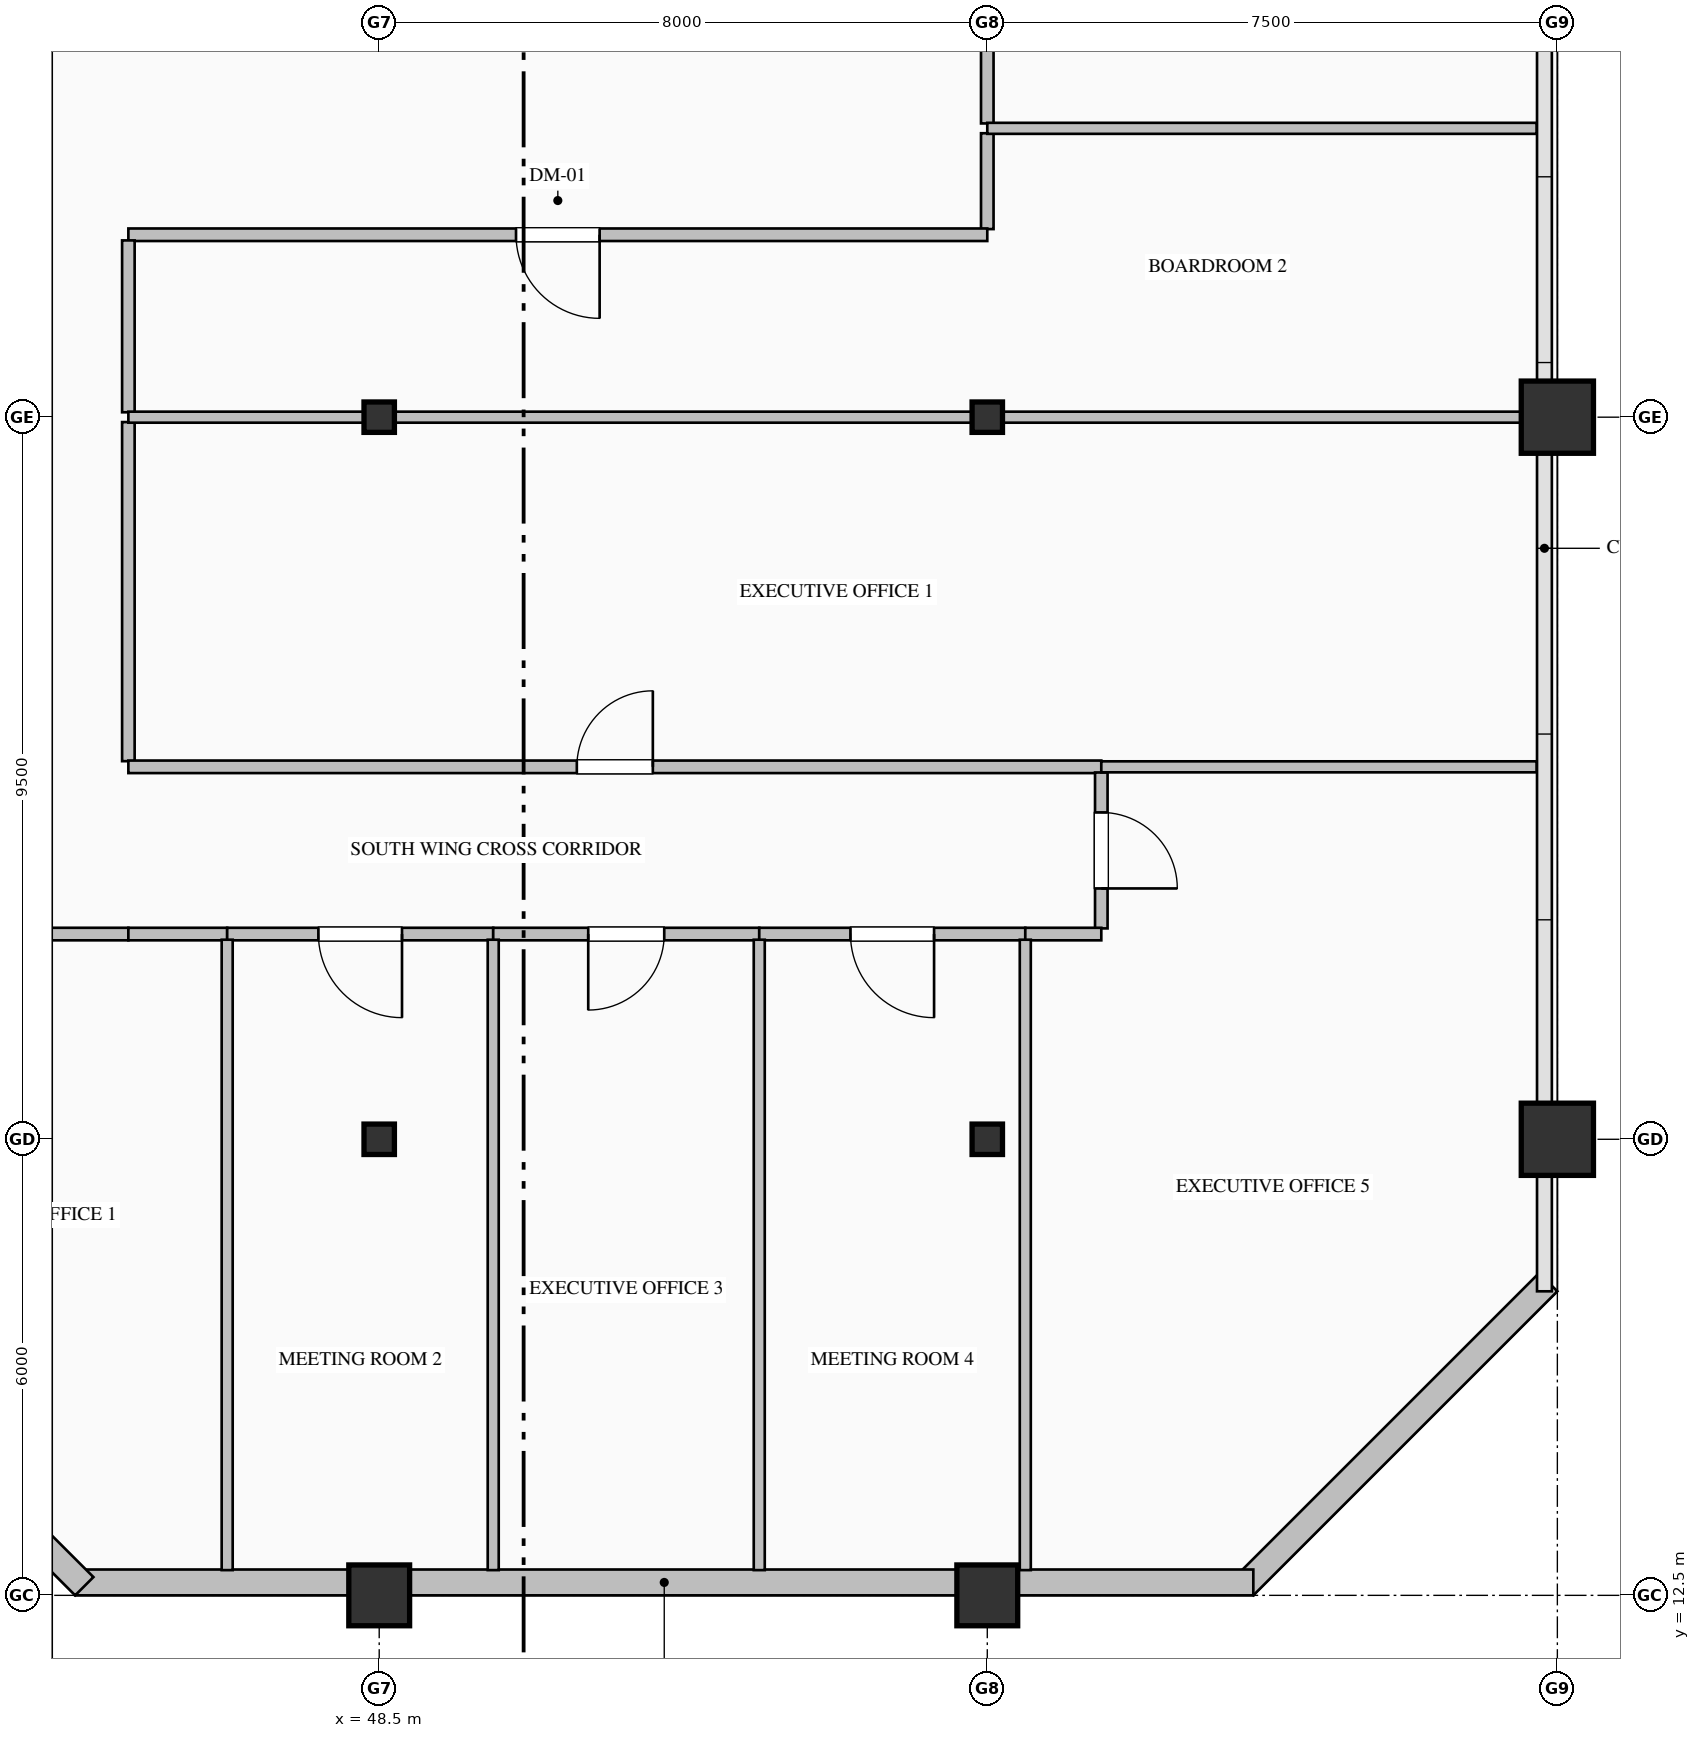
"""IFC4 building model, lengths in metres.
Left out: names, types, materials, properties, quantities, classifications, styles, units other than length and angle.
Written with IfcOpenShell. Run it as: python <this file> out.ifc"""

import sys

from ifc_helpers import new_model, si_unit, direction, frame, frame_2d, origin, origin_2d, place, context, subcontext, project, spatial, rectangle, hollow_rectangle, i_section, extrude, element, fill, save


model = new_model("IFC4")
c1 = context("Model", 3, precision=1e-05, world=origin(), true_north=direction((0.0, 1.0)))
c2 = subcontext(c1, "Body", "Model", "MODEL_VIEW")
j1 = project(units=[si_unit("LENGTHUNIT", "METRE"), si_unit("PLANEANGLEUNIT", "RADIAN")], contexts=[c1])
p1 = place(None, origin())
s1 = spatial("IfcSite", under=j1, at=p1, CompositionType="ELEMENT")
p2 = place(p1, origin())
s2 = spatial("IfcBuilding", under=s1, at=p2, CompositionType="ELEMENT")
p3 = place(p2, frame((0.0, 0.0, 209.8)))
s3 = spatial("IfcBuildingStorey", under=s2, at=p3, CompositionType="ELEMENT", Elevation=209.8)
p4 = place(p3, frame((48.5, 12.5, 0.0), z_axis=(0.0, 0.0, 1.0), x_axis=(1.0, 0.0, 0.0)))
e1 = element("IfcColumn", 1, at=p4, inside=s3, PredefinedType="COLUMN", context=c2, shape_type="SweptSolid", body=[
    extrude(hollow_rectangle(XDim=0.8, YDim=0.8, WallThickness=0.032, at=origin_2d()), origin(), (0.0, 0.0, 1.0), 4.0),
])
for number, where, z_axis, x_axis in (
    (2, (48.5, 18.5, 0.0), (0.0, 0.0, 1.0), (1.0, 0.0, 0.0)),
    (3, (48.5, 28.0, 0.0), (0.0, 0.0, 1.0), (1.0, 0.0, 0.0)),
):
    element("IfcColumn", number, at=place(p3, frame(where, z_axis=z_axis, x_axis=x_axis)), inside=s3, PredefinedType="COLUMN", context=c2, shape_type="SweptSolid", body=[
        extrude(i_section(OverallWidth=0.4, OverallDepth=0.4, WebThickness=0.013, FlangeThickness=0.021, FilletRadius=0.022, at=origin_2d()), origin(), (0.0, 0.0, 1.0), 4.0),
    ])
p5 = place(p3, frame((56.5, 12.5, 0.0), z_axis=(0.0, 0.0, 1.0), x_axis=(1.0, 0.0, 0.0)))
e4 = element("IfcColumn", 4, at=p5, inside=s3, PredefinedType="COLUMN", context=c2, shape_type="SweptSolid", body=[
    extrude(hollow_rectangle(XDim=0.8, YDim=0.8, WallThickness=0.032, at=origin_2d()), origin(), (0.0, 0.0, 1.0), 4.0),
])
for number, where, z_axis, x_axis in (
    (5, (56.5, 18.5, 0.0), (0.0, 0.0, 1.0), (1.0, 0.0, 0.0)),
    (6, (56.5, 28.0, 0.0), (0.0, 0.0, 1.0), (1.0, 0.0, 0.0)),
):
    element("IfcColumn", number, at=place(p3, frame(where, z_axis=z_axis, x_axis=x_axis)), inside=s3, PredefinedType="COLUMN", context=c2, shape_type="SweptSolid", body=[
        extrude(i_section(OverallWidth=0.4, OverallDepth=0.4, WebThickness=0.013, FlangeThickness=0.021, FilletRadius=0.022, at=origin_2d()), origin(), (0.0, 0.0, 1.0), 4.0),
    ])
for number, where, z_axis, x_axis in (
    (7, (64.0, 18.5, 0.0), (0.0, 0.0, 1.0), (1.0, 0.0, 0.0)),
    (8, (64.0, 28.0, 0.0), (0.0, 0.0, 1.0), (1.0, 0.0, 0.0)),
):
    element("IfcColumn", number, at=place(p3, frame(where, z_axis=z_axis, x_axis=x_axis)), inside=s3, PredefinedType="COLUMN", context=c2, shape_type="SweptSolid", body=[
        extrude(hollow_rectangle(XDim=0.95, YDim=0.95, WallThickness=0.036, at=origin_2d()), origin(), (0.0, 0.0, 1.0), 4.0),
    ])
p6 = place(p3, frame((63.88, 16.62, 0.0), z_axis=(0.0, 0.0, 1.0), x_axis=(-0.707106781187, -0.707106781187, 0.0)))
e9 = element("IfcWall", 9, at=p6, inside=s3, PredefinedType="SOLIDWALL", context=c2, shape_type="SweptSolid", body=[
    extrude(rectangle(XDim=5.657, YDim=0.34, at=frame_2d((2.828, 0.0))), origin(), (0.0, 0.0, 1.0), 3.775),
])
p7 = place(p3, frame((60.0, 12.67, 0.0), z_axis=(0.0, 0.0, 1.0), x_axis=(-1.0, 0.0, 0.0)))
e10 = element("IfcWall", 10, at=p7, inside=s3, PredefinedType="SOLIDWALL", context=c2, shape_type="SweptSolid", body=[
    extrude(rectangle(XDim=15.5, YDim=0.34, at=frame_2d((7.75, 0.0))), origin(), (0.0, 0.0, 1.0), 3.325),
])
p8 = place(p3, frame((44.62, 12.62, 0.0), z_axis=(0.0, 0.0, 1.0), x_axis=(-0.707106781187, 0.707106781187, 0.0)))
e11 = element("IfcWall", 11, at=p8, inside=s3, PredefinedType="SOLIDWALL", context=c2, shape_type="SweptSolid", body=[
    extrude(rectangle(XDim=5.657, YDim=0.34, at=frame_2d((2.828, 0.0))), origin(), (0.0, 0.0, 1.0), 3.775),
])
p9 = place(p3, frame((56.5, 31.736, 0.0), z_axis=(0.0, 0.0, 1.0), x_axis=(0.0, -1.0, 0.0)))
e12 = element("IfcWall", 12, at=p9, inside=s3, PredefinedType="PARTITIONING", context=c2, shape_type="SweptSolid", body=[
    extrude(rectangle(XDim=1.261, YDim=0.165, at=frame_2d((0.63, 0.0))), origin(), (0.0, 0.0, 1.0), 3.179),
])
p10 = place(p3, frame((56.5, 30.4, 0.0), z_axis=(0.0, 0.0, 1.0), x_axis=(-1.0, 0.0, 0.0)))
e13 = element("IfcWall", 13, at=p10, inside=s3, PredefinedType="PARTITIONING", context=c2, shape_type="SweptSolid", body=[
    extrude(rectangle(XDim=11.3, YDim=0.165, at=frame_2d((5.65, 0.0))), origin(), (0.0, 0.0, 1.0), 3.775),
])
p11 = place(p10, frame((5.1, 0.0, 0.0)))
e14 = element("IfcOpeningElement", 14, at=p11, cuts=e13, PredefinedType="OPENING", context=c2, shape_type="SweptSolid", body=[
    extrude(rectangle(XDim=1.1, YDim=2.2, at=frame_2d((0.55, 1.1))), frame((0.0, 0.093, 0.0), z_axis=(0.0, -1.0, 0.0), x_axis=(1.0, 0.0, 0.0)), (0.0, 0.0, 1.0), 0.185),
])
p12 = place(p3, frame((56.5, 36.0, 0.0), z_axis=(0.0, 0.0, 1.0), x_axis=(0.0, -1.0, 0.0)))
e15 = element("IfcWall", 15, at=p12, inside=s3, PredefinedType="PARTITIONING", context=c2, shape_type="SweptSolid", body=[
    extrude(rectangle(XDim=4.135, YDim=0.165, at=frame_2d((2.068, 0.0))), origin(), (0.0, 0.0, 1.0), 3.179),
])
p13 = place(p12, frame((1.568, 0.0, 0.0)))
e16 = element("IfcOpeningElement", 16, at=p13, cuts=e15, PredefinedType="OPENING", context=c2, shape_type="SweptSolid", body=[
    extrude(rectangle(XDim=1.0, YDim=2.15, at=frame_2d((0.5, 1.075))), frame((0.0, 0.093, 0.0), z_axis=(0.0, -1.0, 0.0), x_axis=(1.0, 0.0, 0.0)), (0.0, 0.0, 1.0), 0.185),
])
p14 = place(p3, frame((45.2, 27.936, 0.0), z_axis=(0.0, 0.0, 1.0), x_axis=(0.0, -1.0, 0.0)))
e17 = element("IfcWall", 17, at=p14, inside=s3, PredefinedType="PARTITIONING", context=c2, shape_type="SweptSolid", body=[
    extrude(rectangle(XDim=4.461, YDim=0.165, at=frame_2d((2.23, 0.0))), origin(), (0.0, 0.0, 1.0), 3.775),
])
p15 = place(p3, frame((45.2, 30.325, 0.0), z_axis=(0.0, 0.0, 1.0), x_axis=(0.0, -1.0, 0.0)))
e18 = element("IfcWall", 18, at=p15, inside=s3, PredefinedType="PARTITIONING", context=c2, shape_type="SweptSolid", body=[
    extrude(rectangle(XDim=2.261, YDim=0.165, at=frame_2d((1.13, 0.0))), origin(), (0.0, 0.0, 1.0), 3.775),
])
p16 = place(p3, frame((45.2, 21.2, 0.0), z_axis=(0.0, 0.0, 1.0), x_axis=(-1.0, 0.0, 0.0)))
e19 = element("IfcWall", 19, at=p16, inside=s3, PredefinedType="PARTITIONING", context=c2, shape_type="SweptSolid", body=[
    extrude(rectangle(XDim=2.2, YDim=0.165, at=frame_2d((1.1, 0.0))), origin(), (0.0, 0.0, 1.0), 3.775),
])
p17 = place(p3, frame((45.2, 23.4, 0.0), z_axis=(0.0, 0.0, 1.0), x_axis=(1.0, 0.0, 0.0)))
e20 = element("IfcWall", 20, at=p17, inside=s3, PredefinedType="PARTITIONING", context=c2, shape_type="SweptSolid", body=[
    extrude(rectangle(XDim=12.8, YDim=0.165, at=frame_2d((6.4, 0.0))), origin(), (0.0, 0.0, 1.0), 3.467),
])
p18 = place(p17, frame((5.9, 0.0, 0.0)))
e21 = element("IfcOpeningElement", 21, at=p18, cuts=e20, PredefinedType="OPENING", context=c2, shape_type="SweptSolid", body=[
    extrude(rectangle(XDim=1.0, YDim=2.15, at=frame_2d((0.5, 1.075))), frame((0.0, 0.093, 0.0), z_axis=(0.0, -1.0, 0.0), x_axis=(1.0, 0.0, 0.0)), (0.0, 0.0, 1.0), 0.185),
])
p19 = place(p3, frame((46.5, 21.2, 0.0), z_axis=(0.0, 0.0, 1.0), x_axis=(-1.0, 0.0, 0.0)))
e22 = element("IfcWall", 22, at=p19, inside=s3, PredefinedType="PARTITIONING", context=c2, shape_type="SweptSolid", body=[
    extrude(rectangle(XDim=1.3, YDim=0.165, at=frame_2d((0.65, 0.0))), origin(), (0.0, 0.0, 1.0), 3.775),
])
p20 = place(p3, frame((50.0, 21.2, 0.0), z_axis=(0.0, 0.0, 1.0), x_axis=(-1.0, 0.0, 0.0)))
e23 = element("IfcWall", 23, at=p20, inside=s3, PredefinedType="PARTITIONING", context=c2, shape_type="SweptSolid", body=[
    extrude(rectangle(XDim=3.5, YDim=0.165, at=frame_2d((1.75, 0.0))), origin(), (0.0, 0.0, 1.0), 3.775),
])
p21 = place(p20, frame((1.2, 0.0, 0.0)))
e24 = element("IfcOpeningElement", 24, at=p21, cuts=e23, PredefinedType="OPENING", context=c2, shape_type="SweptSolid", body=[
    extrude(rectangle(XDim=1.1, YDim=2.2, at=frame_2d((0.55, 1.1))), frame((0.0, 0.093, 0.0), z_axis=(0.0, -1.0, 0.0), x_axis=(1.0, 0.0, 0.0)), (0.0, 0.0, 1.0), 0.185),
])
p22 = place(p3, frame((53.5, 21.2, 0.0), z_axis=(0.0, 0.0, 1.0), x_axis=(-1.0, 0.0, 0.0)))
e25 = element("IfcWall", 25, at=p22, inside=s3, PredefinedType="PARTITIONING", context=c2, shape_type="SweptSolid", body=[
    extrude(rectangle(XDim=3.5, YDim=0.165, at=frame_2d((1.75, 0.0))), origin(), (0.0, 0.0, 1.0), 3.775),
])
p23 = place(p22, frame((1.25, 0.0, 0.0)))
e26 = element("IfcOpeningElement", 26, at=p23, cuts=e25, PredefinedType="OPENING", context=c2, shape_type="SweptSolid", body=[
    extrude(rectangle(XDim=1.0, YDim=2.15, at=frame_2d((0.5, 1.075))), frame((0.0, 0.093, 0.0), z_axis=(0.0, -1.0, 0.0), x_axis=(1.0, 0.0, 0.0)), (0.0, 0.0, 1.0), 0.185),
])
p24 = place(p3, frame((57.0, 21.2, 0.0), z_axis=(0.0, 0.0, 1.0), x_axis=(-1.0, 0.0, 0.0)))
e27 = element("IfcWall", 27, at=p24, inside=s3, PredefinedType="PARTITIONING", context=c2, shape_type="SweptSolid", body=[
    extrude(rectangle(XDim=3.5, YDim=0.165, at=frame_2d((1.75, 0.0))), origin(), (0.0, 0.0, 1.0), 3.775),
])
p25 = place(p24, frame((1.2, 0.0, 0.0)))
e28 = element("IfcOpeningElement", 28, at=p25, cuts=e27, PredefinedType="OPENING", context=c2, shape_type="SweptSolid", body=[
    extrude(rectangle(XDim=1.1, YDim=2.2, at=frame_2d((0.55, 1.1))), frame((0.0, 0.093, 0.0), z_axis=(0.0, -1.0, 0.0), x_axis=(1.0, 0.0, 0.0)), (0.0, 0.0, 1.0), 0.185),
])
p26 = place(p3, frame((58.0, 23.325, 0.0), z_axis=(0.0, 0.0, 1.0), x_axis=(0.0, -1.0, 0.0)))
e29 = element("IfcWall", 29, at=p26, inside=s3, PredefinedType="PARTITIONING", context=c2, shape_type="SweptSolid", body=[
    extrude(rectangle(XDim=2.051, YDim=0.165, at=frame_2d((1.025, 0.0))), origin(), (0.0, 0.0, 1.0), 3.775),
])
p27 = place(p26, frame((0.525, 0.0, 0.0)))
e30 = element("IfcOpeningElement", 30, at=p27, cuts=e29, PredefinedType="OPENING", context=c2, shape_type="SweptSolid", body=[
    extrude(rectangle(XDim=1.0, YDim=2.15, at=frame_2d((0.5, 1.075))), frame((0.0, 0.093, 0.0), z_axis=(0.0, -1.0, 0.0), x_axis=(1.0, 0.0, 0.0)), (0.0, 0.0, 1.0), 0.185),
])
p28 = place(p3, frame((58.0, 21.2, 0.0), z_axis=(0.0, 0.0, 1.0), x_axis=(-1.0, 0.0, 0.0)))
e31 = element("IfcWall", 31, at=p28, inside=s3, PredefinedType="PARTITIONING", context=c2, shape_type="SweptSolid", body=[
    extrude(rectangle(XDim=1.0, YDim=0.165, at=frame_2d((0.5, 0.0))), origin(), (0.0, 0.0, 1.0), 3.775),
])
p29 = place(p3, frame((45.2, 28.0, 0.0), z_axis=(0.0, 0.0, 1.0), x_axis=(1.0, 0.0, 0.0)))
e32 = element("IfcWall", 32, at=p29, inside=s3, PredefinedType="PARTITIONING", context=c2, shape_type="SweptSolid", body=[
    extrude(rectangle(XDim=18.528, YDim=0.145, at=frame_2d((9.264, 0.0))), origin(), (0.0, 0.0, 1.0), 3.179),
])
p30 = place(p3, frame((63.728, 23.4, 0.0), z_axis=(0.0, 0.0, 1.0), x_axis=(-1.0, 0.0, 0.0)))
e33 = element("IfcWall", 33, at=p30, inside=s3, PredefinedType="PARTITIONING", context=c2, shape_type="SweptSolid", body=[
    extrude(rectangle(XDim=5.728, YDim=0.145, at=frame_2d((2.864, 0.0))), origin(), (0.0, 0.0, 1.0), 3.775),
])
p31 = place(p3, frame((56.5, 31.8, 0.0), z_axis=(0.0, 0.0, 1.0), x_axis=(1.0, 0.0, 0.0)))
e34 = element("IfcWall", 34, at=p31, inside=s3, PredefinedType="PARTITIONING", context=c2, shape_type="SweptSolid", body=[
    extrude(rectangle(XDim=7.228, YDim=0.145, at=frame_2d((3.614, 0.0))), origin(), (0.0, 0.0, 1.0), 3.775),
])
for number, where, z_axis, x_axis in (
    (35, (46.5, 21.125, 0.0), (0.0, 0.0, 1.0), (0.0, -1.0, 0.0)),
    (36, (50.0, 21.125, 0.0), (0.0, 0.0, 1.0), (0.0, -1.0, 0.0)),
    (37, (53.5, 21.125, 0.0), (0.0, 0.0, 1.0), (0.0, -1.0, 0.0)),
    (38, (57.0, 21.125, 0.0), (0.0, 0.0, 1.0), (0.0, -1.0, 0.0)),
):
    element("IfcWall", number, at=place(p3, frame(where, z_axis=z_axis, x_axis=x_axis)), inside=s3, PredefinedType="PARTITIONING", context=c2, shape_type="SweptSolid", body=[
        extrude(rectangle(XDim=8.293, YDim=0.145, at=frame_2d((4.147, 0.0))), origin(), (0.0, 0.0, 1.0), 3.775),
    ])
p32 = place(p18, origin())
e39 = element("IfcDoor", 39, at=p32, inside=s3, OperationType="SINGLE_SWING_RIGHT", PredefinedType="DOOR", context=c2, shape_type="SweptSolid", body=[
    extrude(rectangle(XDim=1.0, YDim=2.15, at=frame_2d((0.5, 1.075))), frame((0.0, 0.025, 0.0), z_axis=(0.0, -1.0, 0.0), x_axis=(1.0, 0.0, 0.0)), (0.0, 0.0, 1.0), 0.05),
])
fill(e21, e39)
p33 = place(p11, origin())
e40 = element("IfcDoor", 40, at=p33, inside=s3, OperationType="SINGLE_SWING_LEFT", PredefinedType="DOOR", context=c2, shape_type="SweptSolid", body=[
    extrude(rectangle(XDim=1.1, YDim=2.2, at=frame_2d((0.55, 1.1))), frame((0.0, 0.025, 0.0), z_axis=(0.0, -1.0, 0.0), x_axis=(1.0, 0.0, 0.0)), (0.0, 0.0, 1.0), 0.05),
])
fill(e14, e40)
p34 = place(p21, origin())
e41 = element("IfcDoor", 41, at=p34, inside=s3, OperationType="SINGLE_SWING_LEFT", PredefinedType="DOOR", context=c2, shape_type="SweptSolid", body=[
    extrude(rectangle(XDim=1.1, YDim=2.2, at=frame_2d((0.55, 1.1))), frame((0.0, 0.025, 0.0), z_axis=(0.0, -1.0, 0.0), x_axis=(1.0, 0.0, 0.0)), (0.0, 0.0, 1.0), 0.05),
])
fill(e24, e41)
p35 = place(p23, origin())
e42 = element("IfcDoor", 42, at=p35, inside=s3, OperationType="SINGLE_SWING_RIGHT", PredefinedType="DOOR", context=c2, shape_type="SweptSolid", body=[
    extrude(rectangle(XDim=1.0, YDim=2.15, at=frame_2d((0.5, 1.075))), frame((0.0, 0.025, 0.0), z_axis=(0.0, -1.0, 0.0), x_axis=(1.0, 0.0, 0.0)), (0.0, 0.0, 1.0), 0.05),
])
fill(e26, e42)
p36 = place(p25, origin())
e43 = element("IfcDoor", 43, at=p36, inside=s3, OperationType="SINGLE_SWING_LEFT", PredefinedType="DOOR", context=c2, shape_type="SweptSolid", body=[
    extrude(rectangle(XDim=1.1, YDim=2.2, at=frame_2d((0.55, 1.1))), frame((0.0, 0.025, 0.0), z_axis=(0.0, -1.0, 0.0), x_axis=(1.0, 0.0, 0.0)), (0.0, 0.0, 1.0), 0.05),
])
fill(e28, e43)
p37 = place(p27, origin())
e44 = element("IfcDoor", 44, at=p37, inside=s3, OperationType="SINGLE_SWING_RIGHT", PredefinedType="DOOR", context=c2, shape_type="SweptSolid", body=[
    extrude(rectangle(XDim=1.0, YDim=2.15, at=frame_2d((0.5, 1.075))), frame((0.0, 0.025, 0.0), z_axis=(0.0, -1.0, 0.0), x_axis=(1.0, 0.0, 0.0)), (0.0, 0.0, 1.0), 0.05),
])
fill(e30, e44)
save(model, sys.argv[1])
